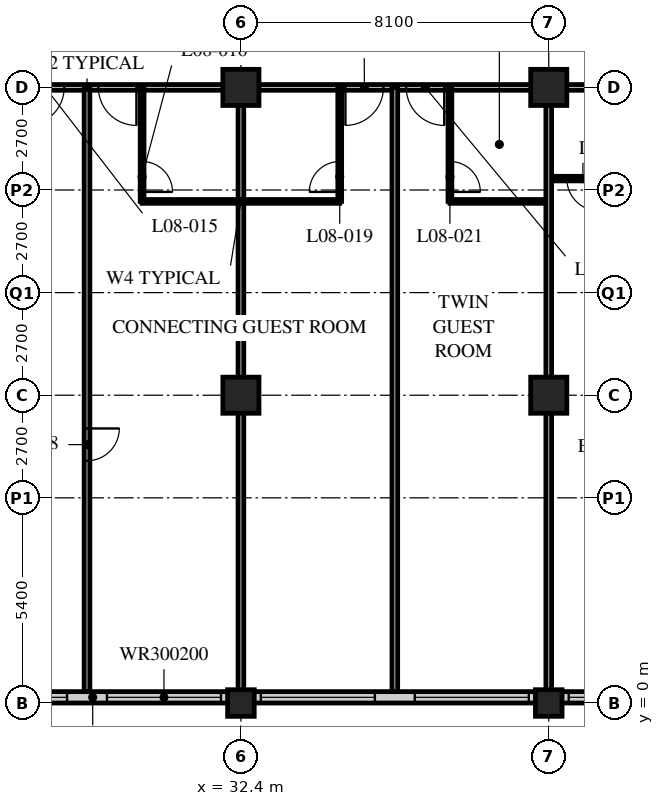
"""IFC4 building model, lengths in metres.
Left out: names, types, materials, properties, quantities, classifications, styles, units other than length and angle.
Written with IfcOpenShell. Run it as: python <this file> out.ifc"""

import sys

from ifc_helpers import new_model, si_unit, direction, frame, frame_2d, origin, origin_2d, place, context, subcontext, project, spatial, rectangle, hollow_rectangle, extrude, element, fill, save


model = new_model("IFC4")
c1 = context("Model", 3, precision=1e-05, world=origin(), true_north=direction((0.0, 1.0)))
c2 = subcontext(c1, "Body", "Model", "MODEL_VIEW")
j1 = project(units=[si_unit("LENGTHUNIT", "METRE"), si_unit("PLANEANGLEUNIT", "RADIAN")], contexts=[c1])
p1 = place(None, origin())
s1 = spatial("IfcSite", under=j1, at=p1, CompositionType="ELEMENT")
p2 = place(p1, origin())
s2 = spatial("IfcBuilding", under=s1, at=p2, CompositionType="ELEMENT")
p3 = place(p2, frame((0.0, 0.0, 39.8)))
s3 = spatial("IfcBuildingStorey", under=s2, at=p3, CompositionType="ELEMENT", Elevation=39.8)
p4 = place(p3, frame((32.4, 0.0, 0.0), z_axis=(0.0, 0.0, 1.0), x_axis=(1.0, 0.0, 0.0)))
e1 = element("IfcColumn", 1, at=p4, inside=s3, PredefinedType="COLUMN", context=c2, shape_type="SweptSolid", body=[
    extrude(hollow_rectangle(XDim=0.7, YDim=0.7, WallThickness=0.06, at=origin_2d()), origin(), (0.0, 0.0, 1.0), 3.4),
])
for number, where, z_axis, x_axis in (
    (2, (32.4, 8.1, 0.0), (0.0, 0.0, 1.0), (1.0, 0.0, 0.0)),
    (3, (32.4, 16.2, 0.0), (0.0, 0.0, 1.0), (1.0, 0.0, 0.0)),
):
    element("IfcColumn", number, at=place(p3, frame(where, z_axis=z_axis, x_axis=x_axis)), inside=s3, PredefinedType="COLUMN", context=c2, shape_type="SweptSolid", body=[
        extrude(hollow_rectangle(XDim=0.95, YDim=0.95, WallThickness=0.095, at=origin_2d()), origin(), (0.0, 0.0, 1.0), 3.4),
    ])
p5 = place(p3, frame((40.5, 0.0, 0.0), z_axis=(0.0, 0.0, 1.0), x_axis=(1.0, 0.0, 0.0)))
e4 = element("IfcColumn", 4, at=p5, inside=s3, PredefinedType="COLUMN", context=c2, shape_type="SweptSolid", body=[
    extrude(hollow_rectangle(XDim=0.7, YDim=0.7, WallThickness=0.06, at=origin_2d()), origin(), (0.0, 0.0, 1.0), 3.4),
])
for number, where, z_axis, x_axis in (
    (5, (40.5, 8.1, 0.0), (0.0, 0.0, 1.0), (1.0, 0.0, 0.0)),
    (6, (40.5, 16.2, 0.0), (0.0, 0.0, 1.0), (1.0, 0.0, 0.0)),
):
    element("IfcColumn", number, at=place(p3, frame(where, z_axis=z_axis, x_axis=x_axis)), inside=s3, PredefinedType="COLUMN", context=c2, shape_type="SweptSolid", body=[
        extrude(hollow_rectangle(XDim=0.95, YDim=0.95, WallThickness=0.095, at=origin_2d()), origin(), (0.0, 0.0, 1.0), 3.4),
    ])
p6 = place(p3, frame((8.4, 0.15, 0.0), z_axis=(0.0, 0.0, 1.0), x_axis=(1.0, 0.0, 0.0)))
e7 = element("IfcWall", 7, at=p6, inside=s3, PredefinedType="SOLIDWALL", context=c2, shape_type="SweptSolid", body=[
    extrude(rectangle(XDim=40.2, YDim=0.3, at=frame_2d((20.1, 0.0))), origin(), (0.0, 0.0, 1.0), 3.19),
])
p7 = place(p6, frame((0.225, 0.0, 0.9)))
e8 = element("IfcOpeningElement", 8, at=p7, cuts=e7, PredefinedType="OPENING", context=c2, shape_type="SweptSolid", body=[
    extrude(rectangle(XDim=3.0, YDim=2.0, at=frame_2d((1.5, 1.0))), frame((0.0, 0.16, 0.0), z_axis=(0.0, -1.0, 0.0), x_axis=(1.0, 0.0, 0.0)), (0.0, 0.0, 1.0), 0.32),
])
p8 = place(p6, frame((4.275, 0.0, 0.9)))
e9 = element("IfcOpeningElement", 9, at=p8, cuts=e7, PredefinedType="OPENING", context=c2, shape_type="SweptSolid", body=[
    extrude(rectangle(XDim=3.0, YDim=2.0, at=frame_2d((1.5, 1.0))), frame((0.0, 0.16, 0.0), z_axis=(0.0, -1.0, 0.0), x_axis=(1.0, 0.0, 0.0)), (0.0, 0.0, 1.0), 0.32),
])
p9 = place(p6, frame((8.325, 0.0, 0.9)))
e10 = element("IfcOpeningElement", 10, at=p9, cuts=e7, PredefinedType="OPENING", context=c2, shape_type="SweptSolid", body=[
    extrude(rectangle(XDim=3.0, YDim=2.0, at=frame_2d((1.5, 1.0))), frame((0.0, 0.16, 0.0), z_axis=(0.0, -1.0, 0.0), x_axis=(1.0, 0.0, 0.0)), (0.0, 0.0, 1.0), 0.32),
])
p10 = place(p6, frame((12.375, 0.0, 0.9)))
e11 = element("IfcOpeningElement", 11, at=p10, cuts=e7, PredefinedType="OPENING", context=c2, shape_type="SweptSolid", body=[
    extrude(rectangle(XDim=3.0, YDim=2.0, at=frame_2d((1.5, 1.0))), frame((0.0, 0.16, 0.0), z_axis=(0.0, -1.0, 0.0), x_axis=(1.0, 0.0, 0.0)), (0.0, 0.0, 1.0), 0.32),
])
p11 = place(p6, frame((16.425, 0.0, 0.9)))
e12 = element("IfcOpeningElement", 12, at=p11, cuts=e7, PredefinedType="OPENING", context=c2, shape_type="SweptSolid", body=[
    extrude(rectangle(XDim=3.0, YDim=2.0, at=frame_2d((1.5, 1.0))), frame((0.0, 0.16, 0.0), z_axis=(0.0, -1.0, 0.0), x_axis=(1.0, 0.0, 0.0)), (0.0, 0.0, 1.0), 0.32),
])
p12 = place(p6, frame((20.475, 0.0, 0.9)))
e13 = element("IfcOpeningElement", 13, at=p12, cuts=e7, PredefinedType="OPENING", context=c2, shape_type="SweptSolid", body=[
    extrude(rectangle(XDim=3.0, YDim=2.0, at=frame_2d((1.5, 1.0))), frame((0.0, 0.16, 0.0), z_axis=(0.0, -1.0, 0.0), x_axis=(1.0, 0.0, 0.0)), (0.0, 0.0, 1.0), 0.32),
])
p13 = place(p6, frame((24.525, 0.0, 0.9)))
e14 = element("IfcOpeningElement", 14, at=p13, cuts=e7, PredefinedType="OPENING", context=c2, shape_type="SweptSolid", body=[
    extrude(rectangle(XDim=3.0, YDim=2.0, at=frame_2d((1.5, 1.0))), frame((0.0, 0.16, 0.0), z_axis=(0.0, -1.0, 0.0), x_axis=(1.0, 0.0, 0.0)), (0.0, 0.0, 1.0), 0.32),
])
p14 = place(p6, frame((28.575, 0.0, 0.9)))
e15 = element("IfcOpeningElement", 15, at=p14, cuts=e7, PredefinedType="OPENING", context=c2, shape_type="SweptSolid", body=[
    extrude(rectangle(XDim=3.0, YDim=2.0, at=frame_2d((1.5, 1.0))), frame((0.0, 0.16, 0.0), z_axis=(0.0, -1.0, 0.0), x_axis=(1.0, 0.0, 0.0)), (0.0, 0.0, 1.0), 0.32),
])
p15 = place(p6, frame((32.625, 0.0, 0.9)))
e16 = element("IfcOpeningElement", 16, at=p15, cuts=e7, PredefinedType="OPENING", context=c2, shape_type="SweptSolid", body=[
    extrude(rectangle(XDim=3.0, YDim=2.0, at=frame_2d((1.5, 1.0))), frame((0.0, 0.16, 0.0), z_axis=(0.0, -1.0, 0.0), x_axis=(1.0, 0.0, 0.0)), (0.0, 0.0, 1.0), 0.32),
])
p16 = place(p6, frame((36.675, 0.0, 0.9)))
e17 = element("IfcOpeningElement", 17, at=p16, cuts=e7, PredefinedType="OPENING", context=c2, shape_type="SweptSolid", body=[
    extrude(rectangle(XDim=3.0, YDim=2.0, at=frame_2d((1.5, 1.0))), frame((0.0, 0.16, 0.0), z_axis=(0.0, -1.0, 0.0), x_axis=(1.0, 0.0, 0.0)), (0.0, 0.0, 1.0), 0.32),
])
p17 = place(p3, frame((12.15, 16.2, 0.0), z_axis=(0.0, 0.0, 1.0), x_axis=(1.0, 0.0, 0.0)))
e18 = element("IfcWall", 18, at=p17, inside=s3, PredefinedType="PARTITIONING", context=c2, shape_type="SweptSolid", body=[
    extrude(rectangle(XDim=32.4, YDim=0.15, at=frame_2d((16.2, 0.0))), origin(), (0.0, 0.0, 1.0), 2.578),
])
p18 = place(p17, frame((6.5, 0.0, 0.0)))
e19 = element("IfcOpeningElement", 19, at=p18, cuts=e18, PredefinedType="OPENING", context=c2, shape_type="SweptSolid", body=[
    extrude(rectangle(XDim=1.0, YDim=2.1, at=frame_2d((0.5, 1.05))), frame((0.0, 0.085, 0.0), z_axis=(0.0, -1.0, 0.0), x_axis=(1.0, 0.0, 0.0)), (0.0, 0.0, 1.0), 0.17),
])
p19 = place(p17, frame((8.4, 0.0, 0.0)))
e20 = element("IfcOpeningElement", 20, at=p19, cuts=e18, PredefinedType="OPENING", context=c2, shape_type="SweptSolid", body=[
    extrude(rectangle(XDim=1.0, YDim=2.1, at=frame_2d((0.5, 1.05))), frame((0.0, 0.085, 0.0), z_axis=(0.0, -1.0, 0.0), x_axis=(1.0, 0.0, 0.0)), (0.0, 0.0, 1.0), 0.17),
])
p20 = place(p17, frame((14.6, 0.0, 0.0)))
e21 = element("IfcOpeningElement", 21, at=p20, cuts=e18, PredefinedType="OPENING", context=c2, shape_type="SweptSolid", body=[
    extrude(rectangle(XDim=1.0, YDim=2.1, at=frame_2d((0.5, 1.05))), frame((0.0, 0.085, 0.0), z_axis=(0.0, -1.0, 0.0), x_axis=(1.0, 0.0, 0.0)), (0.0, 0.0, 1.0), 0.17),
])
p21 = place(p17, frame((16.5, 0.0, 0.0)))
e22 = element("IfcOpeningElement", 22, at=p21, cuts=e18, PredefinedType="OPENING", context=c2, shape_type="SweptSolid", body=[
    extrude(rectangle(XDim=1.0, YDim=2.1, at=frame_2d((0.5, 1.05))), frame((0.0, 0.085, 0.0), z_axis=(0.0, -1.0, 0.0), x_axis=(1.0, 0.0, 0.0)), (0.0, 0.0, 1.0), 0.17),
])
p22 = place(p17, frame((23.0, 0.0, 0.0)))
e23 = element("IfcOpeningElement", 23, at=p22, cuts=e18, PredefinedType="OPENING", context=c2, shape_type="SweptSolid", body=[
    extrude(rectangle(XDim=1.0, YDim=2.1, at=frame_2d((0.5, 1.05))), frame((0.0, 0.085, 0.0), z_axis=(0.0, -1.0, 0.0), x_axis=(1.0, 0.0, 0.0)), (0.0, 0.0, 1.0), 0.17),
])
p23 = place(p17, frame((24.6, 0.0, 0.0)))
e24 = element("IfcOpeningElement", 24, at=p23, cuts=e18, PredefinedType="OPENING", context=c2, shape_type="SweptSolid", body=[
    extrude(rectangle(XDim=1.0, YDim=2.1, at=frame_2d((0.5, 1.05))), frame((0.0, 0.085, 0.0), z_axis=(0.0, -1.0, 0.0), x_axis=(1.0, 0.0, 0.0)), (0.0, 0.0, 1.0), 0.17),
])
p24 = place(p17, frame((1.525, 0.0, 0.0)))
e25 = element("IfcOpeningElement", 25, at=p24, cuts=e18, PredefinedType="OPENING", context=c2, shape_type="SweptSolid", body=[
    extrude(rectangle(XDim=1.0, YDim=2.1, at=frame_2d((0.5, 1.05))), frame((0.0, 0.085, 0.0), z_axis=(0.0, -1.0, 0.0), x_axis=(1.0, 0.0, 0.0)), (0.0, 0.0, 1.0), 0.17),
])
p25 = place(p17, frame((29.875, 0.0, 0.0)))
e26 = element("IfcOpeningElement", 26, at=p25, cuts=e18, PredefinedType="OPENING", context=c2, shape_type="SweptSolid", body=[
    extrude(rectangle(XDim=1.0, YDim=2.1, at=frame_2d((0.5, 1.05))), frame((0.0, 0.085, 0.0), z_axis=(0.0, -1.0, 0.0), x_axis=(1.0, 0.0, 0.0)), (0.0, 0.0, 1.0), 0.17),
])
p26 = place(p3, frame((29.8, 13.2, 0.0), z_axis=(0.0, 0.0, 1.0), x_axis=(1.0, 0.0, 0.0)))
e27 = element("IfcWall", 27, at=p26, inside=s3, PredefinedType="PARTITIONING", context=c2, shape_type="SweptSolid", body=[
    extrude(rectangle(XDim=5.2, YDim=0.1, at=frame_2d((2.6, 0.0))), origin(), (0.0, 0.0, 1.0), 3.19),
])
p27 = place(p3, frame((29.8, 16.2, 0.0), z_axis=(0.0, 0.0, 1.0), x_axis=(0.0, -1.0, 0.0)))
e28 = element("IfcWall", 28, at=p27, inside=s3, PredefinedType="PARTITIONING", context=c2, shape_type="SweptSolid", body=[
    extrude(rectangle(XDim=3.0, YDim=0.1, at=frame_2d((1.5, 0.0))), origin(), (0.0, 0.0, 1.0), 3.19),
])
p28 = place(p27, frame((1.95, 0.0, 0.0)))
e29 = element("IfcOpeningElement", 29, at=p28, cuts=e28, PredefinedType="OPENING", context=c2, shape_type="SweptSolid", body=[
    extrude(rectangle(XDim=0.8, YDim=2.1, at=frame_2d((0.4, 1.05))), frame((0.0, 0.06, 0.0), z_axis=(0.0, -1.0, 0.0), x_axis=(1.0, 0.0, 0.0)), (0.0, 0.0, 1.0), 0.12),
])
p29 = place(p3, frame((28.35, 16.2, 0.0), z_axis=(0.0, 0.0, 1.0), x_axis=(0.0, -1.0, 0.0)))
e30 = element("IfcWall", 30, at=p29, inside=s3, PredefinedType="PARTITIONING", context=c2, shape_type="SweptSolid", body=[
    extrude(rectangle(XDim=15.9, YDim=0.15, at=frame_2d((7.95, 0.0))), origin(), (0.0, 0.0, 1.0), 3.19),
])
p30 = place(p29, frame((8.975, 0.0, 0.0)))
e31 = element("IfcOpeningElement", 31, at=p30, cuts=e30, PredefinedType="OPENING", context=c2, shape_type="SweptSolid", body=[
    extrude(rectangle(XDim=0.85, YDim=2.1, at=frame_2d((0.425, 1.05))), frame((0.0, 0.085, 0.0), z_axis=(0.0, -1.0, 0.0), x_axis=(1.0, 0.0, 0.0)), (0.0, 0.0, 1.0), 0.17),
])
p31 = place(p3, frame((32.4, 16.2, 0.0), z_axis=(0.0, 0.0, 1.0), x_axis=(0.0, -1.0, 0.0)))
e32 = element("IfcWall", 32, at=p31, inside=s3, PredefinedType="PARTITIONING", context=c2, shape_type="SweptSolid", body=[
    extrude(rectangle(XDim=15.9, YDim=0.15, at=frame_2d((7.95, 0.0))), origin(), (0.0, 0.0, 1.0), 2.578),
])
p32 = place(p3, frame((35.0, 16.2, 0.0), z_axis=(0.0, 0.0, 1.0), x_axis=(0.0, -1.0, 0.0)))
e33 = element("IfcWall", 33, at=p32, inside=s3, PredefinedType="PARTITIONING", context=c2, shape_type="SweptSolid", body=[
    extrude(rectangle(XDim=3.0, YDim=0.1, at=frame_2d((1.5, 0.0))), origin(), (0.0, 0.0, 1.0), 3.19),
])
p33 = place(p32, frame((1.95, 0.0, 0.0)))
e34 = element("IfcOpeningElement", 34, at=p33, cuts=e33, PredefinedType="OPENING", context=c2, shape_type="SweptSolid", body=[
    extrude(rectangle(XDim=0.8, YDim=2.1, at=frame_2d((0.4, 1.05))), frame((0.0, 0.06, 0.0), z_axis=(0.0, -1.0, 0.0), x_axis=(1.0, 0.0, 0.0)), (0.0, 0.0, 1.0), 0.12),
])
p34 = place(p3, frame((36.45, 16.2, 0.0), z_axis=(0.0, 0.0, 1.0), x_axis=(0.0, -1.0, 0.0)))
e35 = element("IfcWall", 35, at=p34, inside=s3, PredefinedType="PARTITIONING", context=c2, shape_type="SweptSolid", body=[
    extrude(rectangle(XDim=15.9, YDim=0.15, at=frame_2d((7.95, 0.0))), origin(), (0.0, 0.0, 1.0), 3.19),
])
p35 = place(p3, frame((37.9, 13.2, 0.0), z_axis=(0.0, 0.0, 1.0), x_axis=(1.0, 0.0, 0.0)))
e36 = element("IfcWall", 36, at=p35, inside=s3, PredefinedType="PARTITIONING", context=c2, shape_type="SweptSolid", body=[
    extrude(rectangle(XDim=2.6, YDim=0.1, at=frame_2d((1.3, 0.0))), origin(), (0.0, 0.0, 1.0), 3.19),
])
p36 = place(p3, frame((37.9, 16.2, 0.0), z_axis=(0.0, 0.0, 1.0), x_axis=(0.0, -1.0, 0.0)))
e37 = element("IfcWall", 37, at=p36, inside=s3, PredefinedType="PARTITIONING", context=c2, shape_type="SweptSolid", body=[
    extrude(rectangle(XDim=3.0, YDim=0.1, at=frame_2d((1.5, 0.0))), origin(), (0.0, 0.0, 1.0), 3.19),
])
p37 = place(p36, frame((1.95, 0.0, 0.0)))
e38 = element("IfcOpeningElement", 38, at=p37, cuts=e37, PredefinedType="OPENING", context=c2, shape_type="SweptSolid", body=[
    extrude(rectangle(XDim=0.8, YDim=2.1, at=frame_2d((0.4, 1.05))), frame((0.0, 0.06, 0.0), z_axis=(0.0, -1.0, 0.0), x_axis=(1.0, 0.0, 0.0)), (0.0, 0.0, 1.0), 0.12),
])
p38 = place(p3, frame((40.5, 13.8, 0.0), z_axis=(0.0, 0.0, 1.0), x_axis=(1.0, 0.0, 0.0)))
e39 = element("IfcWall", 39, at=p38, inside=s3, PredefinedType="PARTITIONING", context=c2, shape_type="SweptSolid", body=[
    extrude(rectangle(XDim=8.05, YDim=0.12, at=frame_2d((4.025, 0.0))), origin(), (0.0, 0.0, 1.0), 3.19),
])
p39 = place(p38, frame((0.475, 0.0, 0.0)))
e40 = element("IfcOpeningElement", 40, at=p39, cuts=e39, PredefinedType="OPENING", context=c2, shape_type="SweptSolid", body=[
    extrude(rectangle(XDim=0.85, YDim=2.1, at=frame_2d((0.425, 1.05))), frame((0.0, 0.07, 0.0), z_axis=(0.0, -1.0, 0.0), x_axis=(1.0, 0.0, 0.0)), (0.0, 0.0, 1.0), 0.14),
])
p40 = place(p38, frame((4.325, 0.0, 0.0)))
e41 = element("IfcOpeningElement", 41, at=p40, cuts=e39, PredefinedType="OPENING", context=c2, shape_type="SweptSolid", body=[
    extrude(rectangle(XDim=0.85, YDim=2.1, at=frame_2d((0.425, 1.05))), frame((0.0, 0.07, 0.0), z_axis=(0.0, -1.0, 0.0), x_axis=(1.0, 0.0, 0.0)), (0.0, 0.0, 1.0), 0.14),
])
p41 = place(p3, frame((40.5, 16.2, 0.0), z_axis=(0.0, 0.0, 1.0), x_axis=(0.0, -1.0, 0.0)))
e42 = element("IfcWall", 42, at=p41, inside=s3, PredefinedType="PARTITIONING", context=c2, shape_type="SweptSolid", body=[
    extrude(rectangle(XDim=15.9, YDim=0.15, at=frame_2d((7.95, 0.0))), origin(), (0.0, 0.0, 1.0), 2.578),
])
p42 = place(p11, origin())
e43 = element("IfcWindow", 43, at=p42, inside=s3, PartitioningType="SINGLE_PANEL", PredefinedType="WINDOW", context=c2, shape_type="SweptSolid", body=[
    extrude(rectangle(XDim=3.0, YDim=2.0, at=frame_2d((1.5, 1.0))), frame((0.0, 0.03, 0.0), z_axis=(0.0, -1.0, 0.0), x_axis=(1.0, 0.0, 0.0)), (0.0, 0.0, 1.0), 0.06),
])
fill(e12, e43)
p43 = place(p12, origin())
e44 = element("IfcWindow", 44, at=p43, inside=s3, PartitioningType="SINGLE_PANEL", PredefinedType="WINDOW", context=c2, shape_type="SweptSolid", body=[
    extrude(rectangle(XDim=3.0, YDim=2.0, at=frame_2d((1.5, 1.0))), frame((0.0, 0.03, 0.0), z_axis=(0.0, -1.0, 0.0), x_axis=(1.0, 0.0, 0.0)), (0.0, 0.0, 1.0), 0.06),
])
fill(e13, e44)
p44 = place(p13, origin())
e45 = element("IfcWindow", 45, at=p44, inside=s3, PartitioningType="SINGLE_PANEL", PredefinedType="WINDOW", context=c2, shape_type="SweptSolid", body=[
    extrude(rectangle(XDim=3.0, YDim=2.0, at=frame_2d((1.5, 1.0))), frame((0.0, 0.03, 0.0), z_axis=(0.0, -1.0, 0.0), x_axis=(1.0, 0.0, 0.0)), (0.0, 0.0, 1.0), 0.06),
])
fill(e14, e45)
p45 = place(p14, origin())
e46 = element("IfcWindow", 46, at=p45, inside=s3, PartitioningType="SINGLE_PANEL", PredefinedType="WINDOW", context=c2, shape_type="SweptSolid", body=[
    extrude(rectangle(XDim=3.0, YDim=2.0, at=frame_2d((1.5, 1.0))), frame((0.0, 0.03, 0.0), z_axis=(0.0, -1.0, 0.0), x_axis=(1.0, 0.0, 0.0)), (0.0, 0.0, 1.0), 0.06),
])
fill(e15, e46)
p46 = place(p15, origin())
e47 = element("IfcWindow", 47, at=p46, inside=s3, PartitioningType="SINGLE_PANEL", PredefinedType="WINDOW", context=c2, shape_type="SweptSolid", body=[
    extrude(rectangle(XDim=3.0, YDim=2.0, at=frame_2d((1.5, 1.0))), frame((0.0, 0.03, 0.0), z_axis=(0.0, -1.0, 0.0), x_axis=(1.0, 0.0, 0.0)), (0.0, 0.0, 1.0), 0.06),
])
fill(e16, e47)
p47 = place(p20, origin())
e48 = element("IfcDoor", 48, at=p47, inside=s3, OperationType="SINGLE_SWING_RIGHT", PredefinedType="DOOR", context=c2, shape_type="SweptSolid", body=[
    extrude(rectangle(XDim=1.0, YDim=2.1, at=frame_2d((0.5, 1.05))), frame((0.0, 0.025, 0.0), z_axis=(0.0, -1.0, 0.0), x_axis=(1.0, 0.0, 0.0)), (0.0, 0.0, 1.0), 0.05),
])
fill(e21, e48)
p48 = place(p28, origin())
e49 = element("IfcDoor", 49, at=p48, inside=s3, OperationType="SINGLE_SWING_RIGHT", PredefinedType="DOOR", context=c2, shape_type="SweptSolid", body=[
    extrude(rectangle(XDim=0.8, YDim=2.1, at=frame_2d((0.4, 1.05))), frame((0.0, 0.025, 0.0), z_axis=(0.0, -1.0, 0.0), x_axis=(1.0, 0.0, 0.0)), (0.0, 0.0, 1.0), 0.05),
])
fill(e29, e49)
p49 = place(p21, origin())
e50 = element("IfcDoor", 50, at=p49, inside=s3, OperationType="SINGLE_SWING_LEFT", PredefinedType="DOOR", context=c2, shape_type="SweptSolid", body=[
    extrude(rectangle(XDim=1.0, YDim=2.1, at=frame_2d((0.5, 1.05))), frame((0.0, 0.025, 0.0), z_axis=(0.0, -1.0, 0.0), x_axis=(1.0, 0.0, 0.0)), (0.0, 0.0, 1.0), 0.05),
])
fill(e22, e50)
p50 = place(p30, origin())
e51 = element("IfcDoor", 51, at=p50, inside=s3, OperationType="SINGLE_SWING_LEFT", PredefinedType="DOOR", context=c2, shape_type="SweptSolid", body=[
    extrude(rectangle(XDim=0.85, YDim=2.1, at=frame_2d((0.425, 1.05))), frame((0.0, 0.025, 0.0), z_axis=(0.0, -1.0, 0.0), x_axis=(1.0, 0.0, 0.0)), (0.0, 0.0, 1.0), 0.05),
])
fill(e31, e51)
p51 = place(p33, origin())
e52 = element("IfcDoor", 52, at=p51, inside=s3, OperationType="SINGLE_SWING_LEFT", PredefinedType="DOOR", context=c2, shape_type="SweptSolid", body=[
    extrude(rectangle(XDim=0.8, YDim=2.1, at=frame_2d((0.4, 1.05))), frame((0.0, 0.025, 0.0), z_axis=(0.0, -1.0, 0.0), x_axis=(1.0, 0.0, 0.0)), (0.0, 0.0, 1.0), 0.05),
])
fill(e34, e52)
p52 = place(p22, origin())
e53 = element("IfcDoor", 53, at=p52, inside=s3, OperationType="SINGLE_SWING_RIGHT", PredefinedType="DOOR", context=c2, shape_type="SweptSolid", body=[
    extrude(rectangle(XDim=1.0, YDim=2.1, at=frame_2d((0.5, 1.05))), frame((0.0, 0.025, 0.0), z_axis=(0.0, -1.0, 0.0), x_axis=(1.0, 0.0, 0.0)), (0.0, 0.0, 1.0), 0.05),
])
fill(e23, e53)
p53 = place(p37, origin())
e54 = element("IfcDoor", 54, at=p53, inside=s3, OperationType="SINGLE_SWING_RIGHT", PredefinedType="DOOR", context=c2, shape_type="SweptSolid", body=[
    extrude(rectangle(XDim=0.8, YDim=2.1, at=frame_2d((0.4, 1.05))), frame((0.0, 0.025, 0.0), z_axis=(0.0, -1.0, 0.0), x_axis=(1.0, 0.0, 0.0)), (0.0, 0.0, 1.0), 0.05),
])
fill(e38, e54)
p54 = place(p23, origin())
e55 = element("IfcDoor", 55, at=p54, inside=s3, OperationType="SINGLE_SWING_LEFT", PredefinedType="DOOR", context=c2, shape_type="SweptSolid", body=[
    extrude(rectangle(XDim=1.0, YDim=2.1, at=frame_2d((0.5, 1.05))), frame((0.0, 0.025, 0.0), z_axis=(0.0, -1.0, 0.0), x_axis=(1.0, 0.0, 0.0)), (0.0, 0.0, 1.0), 0.05),
])
fill(e24, e55)
p55 = place(p39, origin())
e56 = element("IfcDoor", 56, at=p55, inside=s3, OperationType="SINGLE_SWING_LEFT", PredefinedType="DOOR", context=c2, shape_type="SweptSolid", body=[
    extrude(rectangle(XDim=0.85, YDim=2.1, at=frame_2d((0.425, 1.05))), frame((0.0, 0.025, 0.0), z_axis=(0.0, -1.0, 0.0), x_axis=(1.0, 0.0, 0.0)), (0.0, 0.0, 1.0), 0.05),
])
fill(e40, e56)
save(model, sys.argv[1])
